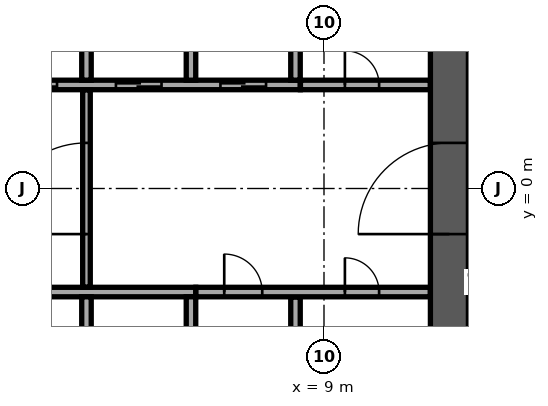
"""IFC4 building model, lengths in metres.
Left out: names, types, materials, properties, quantities, classifications, styles, units other than length and angle.
Written with IfcOpenShell. Run it as: python <this file> out.ifc"""

import sys

from ifc_helpers import new_model, si_unit, direction, frame, frame_2d, origin, place, context, subcontext, project, spatial, rectangle, extrude, element, fill, save


model = new_model("IFC4")
c1 = context("Model", 3, precision=1e-05, world=origin(), true_north=direction((0.0, 1.0)))
c2 = subcontext(c1, "Body", "Model", "MODEL_VIEW")
j1 = project(units=[si_unit("LENGTHUNIT", "METRE"), si_unit("PLANEANGLEUNIT", "RADIAN")], contexts=[c1])
p1 = place(None, origin())
s1 = spatial("IfcSite", under=j1, at=p1, CompositionType="ELEMENT")
p2 = place(p1, origin())
s2 = spatial("IfcBuilding", under=s1, at=p2, CompositionType="ELEMENT")
p3 = place(p2, frame((0.0, 0.0, 175.7)))
s3 = spatial("IfcBuildingStorey", under=s2, at=p3, CompositionType="ELEMENT", Elevation=175.7)
p4 = place(p3, frame((12.3, -11.8, 0.0), z_axis=(0.0, 0.0, 1.0), x_axis=(0.0, 1.0, 0.0)))
e1 = element("IfcWall", 1, at=p4, inside=s3, PredefinedType="SHEAR", context=c2, shape_type="SweptSolid", body=[
    extrude(rectangle(XDim=23.6, YDim=1.0, at=frame_2d((11.8, 0.0))), origin(), (0.0, 0.0, 1.0), 3.6),
])
p5 = place(p4, frame((10.6, 0.0, 0.0)))
e2 = element("IfcOpeningElement", 2, at=p5, cuts=e1, PredefinedType="OPENING", context=c2, shape_type="SweptSolid", body=[
    extrude(rectangle(XDim=2.4, YDim=2.4, at=frame_2d((1.2, 1.2))), frame((0.0, 0.51, 0.0), z_axis=(0.0, -1.0, 0.0), x_axis=(1.0, 0.0, 0.0)), (0.0, 0.0, 1.0), 1.02),
])
p6 = place(p3, frame((-8.375, 2.725, 0.0), z_axis=(0.0, 0.0, 1.0), x_axis=(1.0, 0.0, 0.0)))
e3 = element("IfcWall", 3, at=p6, inside=s3, PredefinedType="SOLIDWALL", context=c2, shape_type="SweptSolid", body=[
    extrude(rectangle(XDim=16.75, YDim=0.25, at=frame_2d((8.375, 0.0))), origin(), (0.0, 0.0, 1.0), 3.6),
])
p7 = place(p6, frame((0.9, 0.0, 0.0)))
e4 = element("IfcOpeningElement", 4, at=p7, cuts=e3, PredefinedType="OPENING", context=c2, shape_type="SweptSolid", body=[
    extrude(rectangle(XDim=1.2, YDim=2.1, at=frame_2d((0.6, 1.05))), frame((0.0, 0.135, 0.0), z_axis=(0.0, -1.0, 0.0), x_axis=(1.0, 0.0, 0.0)), (0.0, 0.0, 1.0), 0.27),
])
p8 = place(p6, frame((3.65, 0.0, 0.0)))
e5 = element("IfcOpeningElement", 5, at=p8, cuts=e3, PredefinedType="OPENING", context=c2, shape_type="SweptSolid", body=[
    extrude(rectangle(XDim=1.2, YDim=2.1, at=frame_2d((0.6, 1.05))), frame((0.0, 0.135, 0.0), z_axis=(0.0, -1.0, 0.0), x_axis=(1.0, 0.0, 0.0)), (0.0, 0.0, 1.0), 0.27),
])
p9 = place(p6, frame((6.4, 0.0, 0.0)))
e6 = element("IfcOpeningElement", 6, at=p9, cuts=e3, PredefinedType="OPENING", context=c2, shape_type="SweptSolid", body=[
    extrude(rectangle(XDim=1.2, YDim=2.1, at=frame_2d((0.6, 1.05))), frame((0.0, 0.135, 0.0), z_axis=(0.0, -1.0, 0.0), x_axis=(1.0, 0.0, 0.0)), (0.0, 0.0, 1.0), 0.27),
])
p10 = place(p6, frame((9.15, 0.0, 0.0)))
e7 = element("IfcOpeningElement", 7, at=p10, cuts=e3, PredefinedType="OPENING", context=c2, shape_type="SweptSolid", body=[
    extrude(rectangle(XDim=1.2, YDim=2.1, at=frame_2d((0.6, 1.05))), frame((0.0, 0.135, 0.0), z_axis=(0.0, -1.0, 0.0), x_axis=(1.0, 0.0, 0.0)), (0.0, 0.0, 1.0), 0.27),
])
p11 = place(p6, frame((11.9, 0.0, 0.0)))
e8 = element("IfcOpeningElement", 8, at=p11, cuts=e3, PredefinedType="OPENING", context=c2, shape_type="SweptSolid", body=[
    extrude(rectangle(XDim=1.2, YDim=2.1, at=frame_2d((0.6, 1.05))), frame((0.0, 0.135, 0.0), z_axis=(0.0, -1.0, 0.0), x_axis=(1.0, 0.0, 0.0)), (0.0, 0.0, 1.0), 0.27),
])
p12 = place(p6, frame((14.65, 0.0, 0.0)))
e9 = element("IfcOpeningElement", 9, at=p12, cuts=e3, PredefinedType="OPENING", context=c2, shape_type="SweptSolid", body=[
    extrude(rectangle(XDim=1.2, YDim=2.1, at=frame_2d((0.6, 1.05))), frame((0.0, 0.135, 0.0), z_axis=(0.0, -1.0, 0.0), x_axis=(1.0, 0.0, 0.0)), (0.0, 0.0, 1.0), 0.27),
])
for number, where, z_axis, x_axis in (
    (10, (2.75, 2.85, 0.0), (0.0, 0.0, 1.0), (0.0, 1.0, 0.0)),
    (11, (5.5, 2.85, 0.0), (0.0, 0.0, 1.0), (0.0, 1.0, 0.0)),
    (12, (8.25, 2.85, 0.0), (0.0, 0.0, 1.0), (0.0, 1.0, 0.0)),
):
    element("IfcWall", number, at=place(p3, frame(where, z_axis=z_axis, x_axis=x_axis)), inside=s3, PredefinedType="SOLIDWALL", context=c2, shape_type="SweptSolid", body=[
        extrude(rectangle(XDim=2.7, YDim=0.25, at=frame_2d((1.35, 0.0))), origin(), (0.0, 0.0, 1.0), 3.6),
    ])
p13 = place(p3, frame((-2.875, -2.725, 0.0), z_axis=(0.0, 0.0, 1.0), x_axis=(1.0, 0.0, 0.0)))
e13 = element("IfcWall", 13, at=p13, inside=s3, PredefinedType="SOLIDWALL", context=c2, shape_type="SweptSolid", body=[
    extrude(rectangle(XDim=8.5, YDim=0.25, at=frame_2d((4.25, 0.0))), origin(), (0.0, 0.0, 1.0), 3.6),
])
for number, where, z_axis, x_axis in (
    (14, (2.75, -5.55, 0.0), (0.0, 0.0, 1.0), (0.0, 1.0, 0.0)),
    (15, (5.5, -5.55, 0.0), (0.0, 0.0, 1.0), (0.0, 1.0, 0.0)),
):
    element("IfcWall", number, at=place(p3, frame(where, z_axis=z_axis, x_axis=x_axis)), inside=s3, PredefinedType="SOLIDWALL", context=c2, shape_type="SweptSolid", body=[
        extrude(rectangle(XDim=2.7, YDim=0.25, at=frame_2d((1.35, 0.0))), origin(), (0.0, 0.0, 1.0), 3.6),
    ])
p14 = place(p3, frame((8.25, -5.545, 0.0), z_axis=(0.0, 0.0, 1.0), x_axis=(0.0, 1.0, 0.0)))
e16 = element("IfcWall", 16, at=p14, inside=s3, PredefinedType="PARTITIONING", context=c2, shape_type="SweptSolid", body=[
    extrude(rectangle(XDim=2.69, YDim=0.25, at=frame_2d((1.345, 0.0))), origin(), (0.0, 0.0, 1.0), 3.6),
])
p15 = place(p3, frame((5.63, -2.725, 0.0), z_axis=(0.0, 0.0, 1.0), x_axis=(1.0, 0.0, 0.0)))
e17 = element("IfcWall", 17, at=p15, inside=s3, PredefinedType="PARTITIONING", context=c2, shape_type="SweptSolid", body=[
    extrude(rectangle(XDim=6.165, YDim=0.25, at=frame_2d((3.083, 0.0))), origin(), (0.0, 0.0, 1.0), 3.6),
])
p16 = place(p15, frame((0.745, 0.0, 0.0)))
e18 = element("IfcOpeningElement", 18, at=p16, cuts=e17, PredefinedType="OPENING", context=c2, shape_type="SweptSolid", body=[
    extrude(rectangle(XDim=1.0, YDim=2.1, at=frame_2d((0.5, 1.05))), frame((0.0, 0.135, 0.0), z_axis=(0.0, -1.0, 0.0), x_axis=(1.0, 0.0, 0.0)), (0.0, 0.0, 1.0), 0.27),
])
p17 = place(p15, frame((3.92, 0.0, 0.0)))
e19 = element("IfcOpeningElement", 19, at=p17, cuts=e17, PredefinedType="OPENING", context=c2, shape_type="SweptSolid", body=[
    extrude(rectangle(XDim=0.9, YDim=2.1, at=frame_2d((0.45, 1.05))), frame((0.0, 0.135, 0.0), z_axis=(0.0, -1.0, 0.0), x_axis=(1.0, 0.0, 0.0)), (0.0, 0.0, 1.0), 0.27),
])
p18 = place(p3, frame((2.75, -2.595, 0.0), z_axis=(0.0, 0.0, 1.0), x_axis=(0.0, 1.0, 0.0)))
e20 = element("IfcWall", 20, at=p18, inside=s3, PredefinedType="PARTITIONING", context=c2, shape_type="SweptSolid", body=[
    extrude(rectangle(XDim=5.19, YDim=0.2, at=frame_2d((2.595, 0.0))), origin(), (0.0, 0.0, 1.0), 3.6),
])
p19 = place(p18, frame((1.395, 0.0, 0.0)))
e21 = element("IfcOpeningElement", 21, at=p19, cuts=e20, PredefinedType="OPENING", context=c2, shape_type="SweptSolid", body=[
    extrude(rectangle(XDim=2.4, YDim=2.4, at=frame_2d((1.2, 1.2))), frame((0.0, 0.11, 0.0), z_axis=(0.0, -1.0, 0.0), x_axis=(1.0, 0.0, 0.0)), (0.0, 0.0, 1.0), 0.22),
])
p20 = place(p3, frame((8.38, 2.725, 0.0), z_axis=(0.0, 0.0, 1.0), x_axis=(1.0, 0.0, 0.0)))
e22 = element("IfcWall", 22, at=p20, inside=s3, PredefinedType="PARTITIONING", context=c2, shape_type="SweptSolid", body=[
    extrude(rectangle(XDim=3.415, YDim=0.25, at=frame_2d((1.708, 0.0))), origin(), (0.0, 0.0, 1.0), 3.6),
])
p21 = place(p20, frame((1.17, 0.0, 0.0)))
e23 = element("IfcOpeningElement", 23, at=p21, cuts=e22, PredefinedType="OPENING", context=c2, shape_type="SweptSolid", body=[
    extrude(rectangle(XDim=0.9, YDim=2.1, at=frame_2d((0.45, 1.05))), frame((0.0, 0.135, 0.0), z_axis=(0.0, -1.0, 0.0), x_axis=(1.0, 0.0, 0.0)), (0.0, 0.0, 1.0), 0.27),
])
p22 = place(p3, frame((36.503, 1.52, 0.0), z_axis=(0.0, 0.0, 1.0), x_axis=(-0.615660779349, 0.788011297363, 0.0)))
e24 = element("IfcWall", 24, at=p22, inside=s3, PredefinedType="STANDARD", context=c2, shape_type="SweptSolid", body=[
    extrude(rectangle(XDim=42.176, YDim=0.6, at=frame_2d((21.088, 0.0))), origin(), (0.0, 0.0, 1.0), 3.6),
])
p23 = place(p22, frame((1.138, 0.0, 0.9)))
e25 = element("IfcOpeningElement", 25, at=p23, cuts=e24, PredefinedType="OPENING", context=c2, shape_type="SweptSolid", body=[
    extrude(rectangle(XDim=2.3, YDim=2.1, at=frame_2d((1.15, 1.05))), frame((0.0, 0.31, 0.0), z_axis=(0.0, -1.0, 0.0), x_axis=(1.0, 0.0, 0.0)), (0.0, 0.0, 1.0), 0.62),
])
p24 = place(p22, frame((5.776, 0.0, 0.9)))
e26 = element("IfcOpeningElement", 26, at=p24, cuts=e24, PredefinedType="OPENING", context=c2, shape_type="SweptSolid", body=[
    extrude(rectangle(XDim=2.3, YDim=2.1, at=frame_2d((1.15, 1.05))), frame((0.0, 0.31, 0.0), z_axis=(0.0, -1.0, 0.0), x_axis=(1.0, 0.0, 0.0)), (0.0, 0.0, 1.0), 0.62),
])
p25 = place(p22, frame((10.476, 0.0, 0.9)))
e27 = element("IfcOpeningElement", 27, at=p25, cuts=e24, PredefinedType="OPENING", context=c2, shape_type="SweptSolid", body=[
    extrude(rectangle(XDim=2.3, YDim=2.1, at=frame_2d((1.15, 1.05))), frame((0.0, 0.31, 0.0), z_axis=(0.0, -1.0, 0.0), x_axis=(1.0, 0.0, 0.0)), (0.0, 0.0, 1.0), 0.62),
])
p26 = place(p22, frame((15.176, 0.0, 0.9)))
e28 = element("IfcOpeningElement", 28, at=p26, cuts=e24, PredefinedType="OPENING", context=c2, shape_type="SweptSolid", body=[
    extrude(rectangle(XDim=2.3, YDim=2.1, at=frame_2d((1.15, 1.05))), frame((0.0, 0.31, 0.0), z_axis=(0.0, -1.0, 0.0), x_axis=(1.0, 0.0, 0.0)), (0.0, 0.0, 1.0), 0.62),
])
p27 = place(p22, frame((19.876, 0.0, 0.9)))
e29 = element("IfcOpeningElement", 29, at=p27, cuts=e24, PredefinedType="OPENING", context=c2, shape_type="SweptSolid", body=[
    extrude(rectangle(XDim=2.3, YDim=2.1, at=frame_2d((1.15, 1.05))), frame((0.0, 0.31, 0.0), z_axis=(0.0, -1.0, 0.0), x_axis=(1.0, 0.0, 0.0)), (0.0, 0.0, 1.0), 0.62),
])
p28 = place(p22, frame((24.576, 0.0, 0.9)))
e30 = element("IfcOpeningElement", 30, at=p28, cuts=e24, PredefinedType="OPENING", context=c2, shape_type="SweptSolid", body=[
    extrude(rectangle(XDim=2.3, YDim=2.1, at=frame_2d((1.15, 1.05))), frame((0.0, 0.31, 0.0), z_axis=(0.0, -1.0, 0.0), x_axis=(1.0, 0.0, 0.0)), (0.0, 0.0, 1.0), 0.62),
])
p29 = place(p22, frame((33.976, 0.0, 0.9)))
e31 = element("IfcOpeningElement", 31, at=p29, cuts=e24, PredefinedType="OPENING", context=c2, shape_type="SweptSolid", body=[
    extrude(rectangle(XDim=2.3, YDim=2.1, at=frame_2d((1.15, 1.05))), frame((0.0, 0.31, 0.0), z_axis=(0.0, -1.0, 0.0), x_axis=(1.0, 0.0, 0.0)), (0.0, 0.0, 1.0), 0.62),
])
p30 = place(p22, frame((38.676, 0.0, 0.9)))
e32 = element("IfcOpeningElement", 32, at=p30, cuts=e24, PredefinedType="OPENING", context=c2, shape_type="SweptSolid", body=[
    extrude(rectangle(XDim=2.3, YDim=2.1, at=frame_2d((1.15, 1.05))), frame((0.0, 0.31, 0.0), z_axis=(0.0, -1.0, 0.0), x_axis=(1.0, 0.0, 0.0)), (0.0, 0.0, 1.0), 0.62),
])
p31 = place(p3, frame((9.713, 25.187, 0.0), z_axis=(0.0, 0.0, 1.0), x_axis=(0.615659714696, -0.788012129158, 0.0)))
e33 = element("IfcWall", 33, at=p31, inside=s3, PredefinedType="PARTITIONING", context=c2, shape_type="SweptSolid", body=[
    extrude(rectangle(XDim=27.811, YDim=0.15, at=frame_2d((13.905, 0.0))), origin(), (0.0, 0.0, 1.0), 3.15),
])
p32 = place(p31, frame((8.299, 0.0, 0.0)))
e34 = element("IfcOpeningElement", 34, at=p32, cuts=e33, PredefinedType="OPENING", context=c2, shape_type="SweptSolid", body=[
    extrude(rectangle(XDim=1.0, YDim=2.1, at=frame_2d((0.5, 1.05))), frame((0.0, 0.085, 0.0), z_axis=(0.0, -1.0, 0.0), x_axis=(1.0, 0.0, 0.0)), (0.0, 0.0, 1.0), 0.17),
])
p33 = place(p31, frame((15.951, 0.0, 0.0)))
e35 = element("IfcOpeningElement", 35, at=p33, cuts=e33, PredefinedType="OPENING", context=c2, shape_type="SweptSolid", body=[
    extrude(rectangle(XDim=1.0, YDim=2.1, at=frame_2d((0.5, 1.05))), frame((0.0, 0.085, 0.0), z_axis=(0.0, -1.0, 0.0), x_axis=(1.0, 0.0, 0.0)), (0.0, 0.0, 1.0), 0.17),
])
p34 = place(p5, origin())
e36 = element("IfcDoor", 36, at=p34, inside=s3, OperationType="SINGLE_SWING_LEFT", PredefinedType="DOOR", context=c2, shape_type="SweptSolid", body=[
    extrude(rectangle(XDim=2.4, YDim=2.4, at=frame_2d((1.2, 1.2))), frame((0.0, 0.025, 0.0), z_axis=(0.0, -1.0, 0.0), x_axis=(1.0, 0.0, 0.0)), (0.0, 0.0, 1.0), 0.05),
])
fill(e2, e36)
p35 = place(p10, origin())
e37 = element("IfcDoor", 37, at=p35, inside=s3, OperationType="DOUBLE_DOOR_SLIDING", PredefinedType="DOOR", context=c2, shape_type="SweptSolid", body=[
    extrude(rectangle(XDim=1.2, YDim=2.1, at=frame_2d((0.6, 1.05))), frame((0.0, 0.025, 0.0), z_axis=(0.0, -1.0, 0.0), x_axis=(1.0, 0.0, 0.0)), (0.0, 0.0, 1.0), 0.05),
])
fill(e7, e37)
p36 = place(p11, origin())
e38 = element("IfcDoor", 38, at=p36, inside=s3, OperationType="DOUBLE_DOOR_SLIDING", PredefinedType="DOOR", context=c2, shape_type="SweptSolid", body=[
    extrude(rectangle(XDim=1.2, YDim=2.1, at=frame_2d((0.6, 1.05))), frame((0.0, 0.025, 0.0), z_axis=(0.0, -1.0, 0.0), x_axis=(1.0, 0.0, 0.0)), (0.0, 0.0, 1.0), 0.05),
])
fill(e8, e38)
p37 = place(p12, origin())
e39 = element("IfcDoor", 39, at=p37, inside=s3, OperationType="DOUBLE_DOOR_SLIDING", PredefinedType="DOOR", context=c2, shape_type="SweptSolid", body=[
    extrude(rectangle(XDim=1.2, YDim=2.1, at=frame_2d((0.6, 1.05))), frame((0.0, 0.025, 0.0), z_axis=(0.0, -1.0, 0.0), x_axis=(1.0, 0.0, 0.0)), (0.0, 0.0, 1.0), 0.05),
])
fill(e9, e39)
p38 = place(p16, origin())
e40 = element("IfcDoor", 40, at=p38, inside=s3, OperationType="SINGLE_SWING_RIGHT", PredefinedType="DOOR", context=c2, shape_type="SweptSolid", body=[
    extrude(rectangle(XDim=1.0, YDim=2.1, at=frame_2d((0.5, 1.05))), frame((0.0, 0.025, 0.0), z_axis=(0.0, -1.0, 0.0), x_axis=(1.0, 0.0, 0.0)), (0.0, 0.0, 1.0), 0.05),
])
fill(e18, e40)
p39 = place(p21, origin())
e41 = element("IfcDoor", 41, at=p39, inside=s3, OperationType="SINGLE_SWING_RIGHT", PredefinedType="DOOR", context=c2, shape_type="SweptSolid", body=[
    extrude(rectangle(XDim=0.9, YDim=2.1, at=frame_2d((0.45, 1.05))), frame((0.0, 0.025, 0.0), z_axis=(0.0, -1.0, 0.0), x_axis=(1.0, 0.0, 0.0)), (0.0, 0.0, 1.0), 0.05),
])
fill(e23, e41)
p40 = place(p17, origin())
e42 = element("IfcDoor", 42, at=p40, inside=s3, OperationType="SINGLE_SWING_RIGHT", PredefinedType="DOOR", context=c2, shape_type="SweptSolid", body=[
    extrude(rectangle(XDim=0.9, YDim=2.1, at=frame_2d((0.45, 1.05))), frame((0.0, 0.025, 0.0), z_axis=(0.0, -1.0, 0.0), x_axis=(1.0, 0.0, 0.0)), (0.0, 0.0, 1.0), 0.05),
])
fill(e19, e42)
p41 = place(p19, origin())
e43 = element("IfcDoor", 43, at=p41, inside=s3, OperationType="DOUBLE_DOOR_DOUBLE_SWING", PredefinedType="DOOR", context=c2, shape_type="SweptSolid", body=[
    extrude(rectangle(XDim=2.4, YDim=2.4, at=frame_2d((1.2, 1.2))), frame((0.0, 0.025, 0.0), z_axis=(0.0, -1.0, 0.0), x_axis=(1.0, 0.0, 0.0)), (0.0, 0.0, 1.0), 0.05),
])
fill(e21, e43)
save(model, sys.argv[1])
